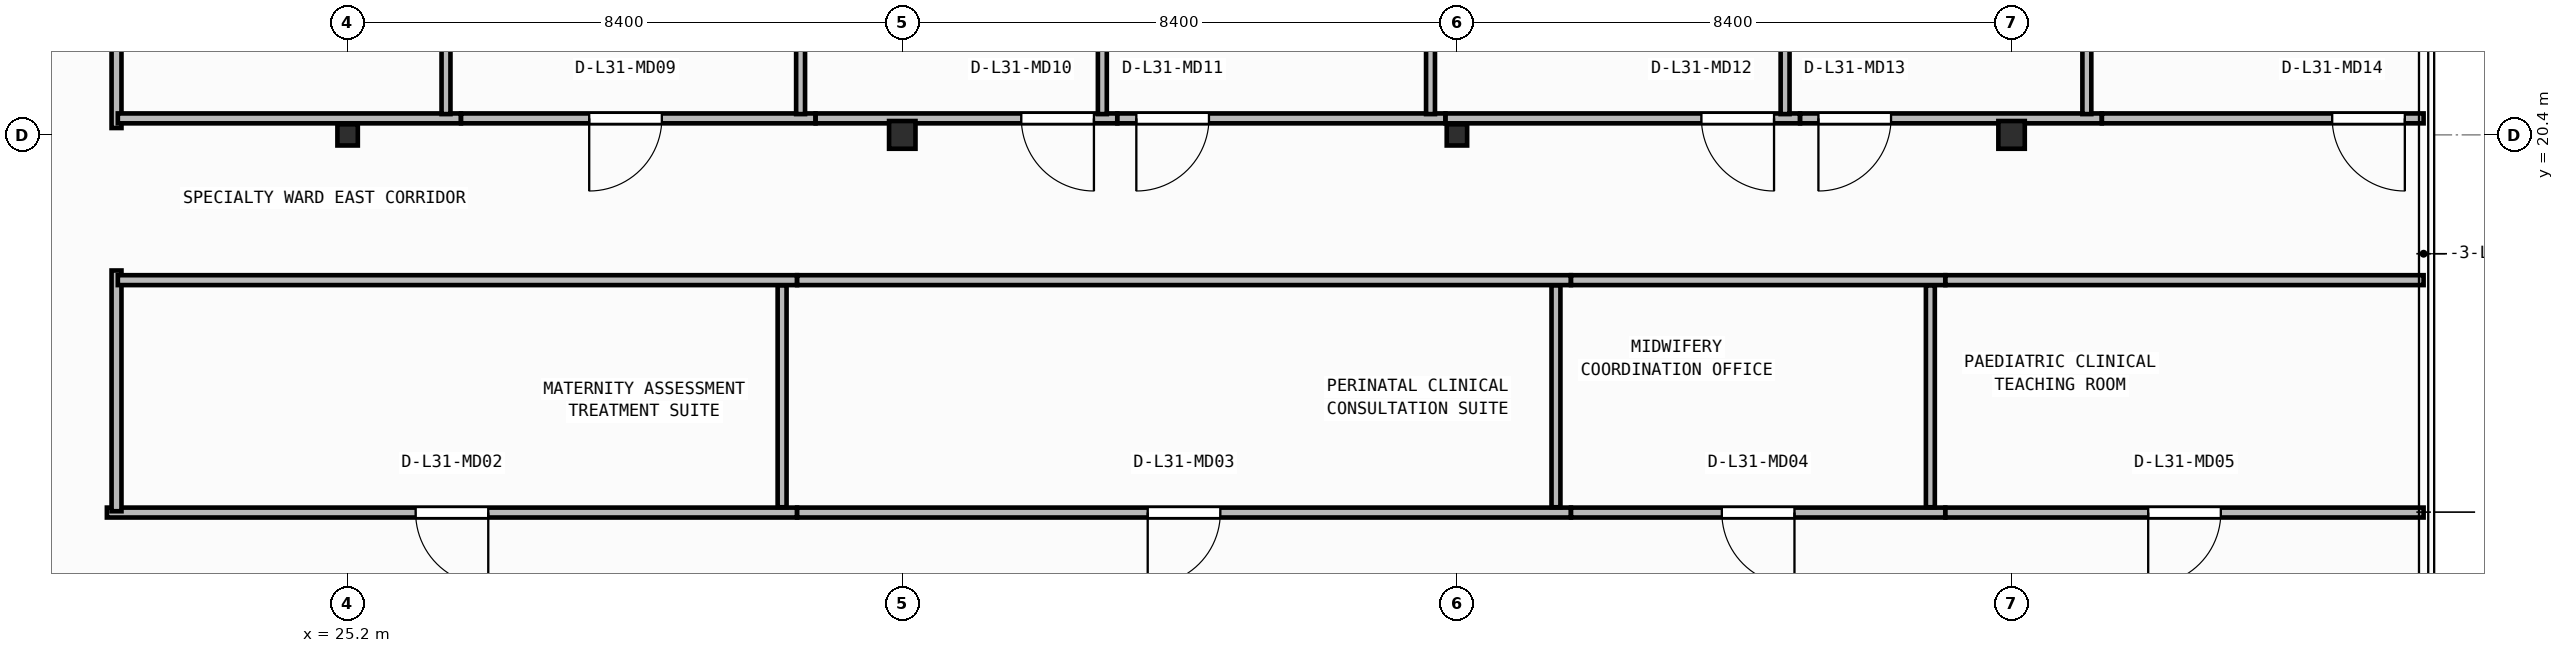
"""IFC4 building model, lengths in metres.
Left out: names, types, materials, properties, quantities, classifications, styles, units other than length and angle.
Written with IfcOpenShell. Run it as: python <this file> out.ifc"""

import sys

from ifc_helpers import new_model, si_unit, direction, frame, frame_2d, origin, origin_2d, place, context, subcontext, project, spatial, rectangle, i_section, extrude, element, fill, save


model = new_model("IFC4")
c1 = context("Model", 3, precision=1e-05, world=origin(), true_north=direction((0.0, 1.0)))
c2 = subcontext(c1, "Body", "Model", "MODEL_VIEW")
j1 = project(units=[si_unit("LENGTHUNIT", "METRE"), si_unit("PLANEANGLEUNIT", "RADIAN")], contexts=[c1])
p1 = place(None, origin())
s1 = spatial("IfcSite", under=j1, at=p1, CompositionType="ELEMENT")
p2 = place(p1, origin())
s2 = spatial("IfcBuilding", under=s1, at=p2, CompositionType="ELEMENT")
p3 = place(p2, frame((0.0, 0.0, 127.05)))
s3 = spatial("IfcBuildingStorey", under=s2, at=p3, CompositionType="ELEMENT", Elevation=127.05)
p4 = place(p3, frame((25.2, 20.4, 0.0), z_axis=(0.0, 0.0, 1.0), x_axis=(1.0, 0.0, 0.0)))
e1 = element("IfcColumn", 1, at=p4, inside=s3, PredefinedType="COLUMN", context=c2, shape_type="SweptSolid", body=[
    extrude(i_section(OverallWidth=0.309, OverallDepth=0.321, WebThickness=0.014, FlangeThickness=0.022, FilletRadius=0.017, at=origin_2d()), origin(), (0.0, 0.0, 1.0), 3.95),
])
p5 = place(p3, frame((33.6, 20.4, 0.0), z_axis=(0.0, 0.0, 1.0), x_axis=(1.0, 0.0, 0.0)))
e2 = element("IfcColumn", 2, at=p5, inside=s3, PredefinedType="COLUMN", context=c2, shape_type="SweptSolid", body=[
    extrude(i_section(OverallWidth=0.4, OverallDepth=0.42, WebThickness=0.025, FlangeThickness=0.04, at=origin_2d()), origin(), (0.0, 0.0, 1.0), 3.95),
])
p6 = place(p3, frame((42.0, 20.4, 0.0), z_axis=(0.0, 0.0, 1.0), x_axis=(1.0, 0.0, 0.0)))
e3 = element("IfcColumn", 3, at=p6, inside=s3, PredefinedType="COLUMN", context=c2, shape_type="SweptSolid", body=[
    extrude(i_section(OverallWidth=0.309, OverallDepth=0.321, WebThickness=0.014, FlangeThickness=0.022, FilletRadius=0.017, at=origin_2d()), origin(), (0.0, 0.0, 1.0), 3.95),
])
p7 = place(p3, frame((50.4, 20.4, 0.0), z_axis=(0.0, 0.0, 1.0), x_axis=(1.0, 0.0, 0.0)))
e4 = element("IfcColumn", 4, at=p7, inside=s3, PredefinedType="COLUMN", context=c2, shape_type="SweptSolid", body=[
    extrude(i_section(OverallWidth=0.4, OverallDepth=0.42, WebThickness=0.025, FlangeThickness=0.04, at=origin_2d()), origin(), (0.0, 0.0, 1.0), 3.95),
])
p8 = place(p3, frame((32.006, 14.68, 0.0), z_axis=(0.0, 0.0, 1.0), x_axis=(-1.0, 0.0, 0.0)))
e5 = element("IfcWall", 5, at=p8, inside=s3, PredefinedType="PARTITIONING", context=c2, shape_type="SweptSolid", body=[
    extrude(rectangle(XDim=10.452, YDim=0.15, at=frame_2d((5.226, 0.0))), origin(), (0.0, 0.0, 1.0), 3.71),
])
p9 = place(p8, frame((4.676, 0.0, 0.0)))
e6 = element("IfcOpeningElement", 6, at=p9, cuts=e5, PredefinedType="OPENING", context=c2, shape_type="SweptSolid", body=[
    extrude(rectangle(XDim=1.1, YDim=2.1, at=frame_2d((0.55, 1.05))), frame((0.0, 0.085, 0.0), z_axis=(0.0, -1.0, 0.0), x_axis=(1.0, 0.0, 0.0)), (0.0, 0.0, 1.0), 0.17),
])
p10 = place(p3, frame((43.726, 14.68, 0.0), z_axis=(0.0, 0.0, 1.0), x_axis=(-1.0, 0.0, 0.0)))
e7 = element("IfcWall", 7, at=p10, inside=s3, PredefinedType="PARTITIONING", context=c2, shape_type="SweptSolid", body=[
    extrude(rectangle(XDim=11.718, YDim=0.15, at=frame_2d((5.859, 0.0))), origin(), (0.0, 0.0, 1.0), 3.71),
])
p11 = place(p10, frame((5.309, 0.0, 0.0)))
e8 = element("IfcOpeningElement", 8, at=p11, cuts=e7, PredefinedType="OPENING", context=c2, shape_type="SweptSolid", body=[
    extrude(rectangle(XDim=1.1, YDim=2.1, at=frame_2d((0.55, 1.05))), frame((0.0, 0.085, 0.0), z_axis=(0.0, -1.0, 0.0), x_axis=(1.0, 0.0, 0.0)), (0.0, 0.0, 1.0), 0.17),
])
p12 = place(p3, frame((49.396, 14.68, 0.0), z_axis=(0.0, 0.0, 1.0), x_axis=(-1.0, 0.0, 0.0)))
e9 = element("IfcWall", 9, at=p12, inside=s3, PredefinedType="PARTITIONING", context=c2, shape_type="SweptSolid", body=[
    extrude(rectangle(XDim=5.668, YDim=0.15, at=frame_2d((2.834, 0.0))), origin(), (0.0, 0.0, 1.0), 3.71),
])
p13 = place(p12, frame((2.284, 0.0, 0.0)))
e10 = element("IfcOpeningElement", 10, at=p13, cuts=e9, PredefinedType="OPENING", context=c2, shape_type="SweptSolid", body=[
    extrude(rectangle(XDim=1.1, YDim=2.1, at=frame_2d((0.55, 1.05))), frame((0.0, 0.085, 0.0), z_axis=(0.0, -1.0, 0.0), x_axis=(1.0, 0.0, 0.0)), (0.0, 0.0, 1.0), 0.17),
])
p14 = place(p3, frame((56.64, 14.68, 0.0), z_axis=(0.0, 0.0, 1.0), x_axis=(-1.0, 0.0, 0.0)))
e11 = element("IfcWall", 11, at=p14, inside=s3, PredefinedType="PARTITIONING", context=c2, shape_type="SweptSolid", body=[
    extrude(rectangle(XDim=7.242, YDim=0.15, at=frame_2d((3.621, 0.0))), origin(), (0.0, 0.0, 1.0), 3.71),
])
p15 = place(p14, frame((3.071, 0.0, 0.0)))
e12 = element("IfcOpeningElement", 12, at=p15, cuts=e11, PredefinedType="OPENING", context=c2, shape_type="SweptSolid", body=[
    extrude(rectangle(XDim=1.1, YDim=2.1, at=frame_2d((0.55, 1.05))), frame((0.0, 0.085, 0.0), z_axis=(0.0, -1.0, 0.0), x_axis=(1.0, 0.0, 0.0)), (0.0, 0.0, 1.0), 0.17),
])
p16 = place(p3, frame((21.7, 14.7, 0.0), z_axis=(0.0, 0.0, 1.0), x_axis=(0.0, 1.0, 0.0)))
e13 = element("IfcWall", 13, at=p16, inside=s3, PredefinedType="PARTITIONING", context=c2, shape_type="SweptSolid", body=[
    extrude(rectangle(XDim=3.646, YDim=0.15, at=frame_2d((1.823, 0.0))), origin(), (0.0, 0.0, 1.0), 3.71),
])
p17 = place(p3, frame((21.7, 20.504, 0.0), z_axis=(0.0, 0.0, 1.0), x_axis=(0.0, 1.0, 0.0)))
e14 = element("IfcWall", 14, at=p17, inside=s3, PredefinedType="PARTITIONING", context=c2, shape_type="SweptSolid", body=[
    extrude(rectangle(XDim=6.756, YDim=0.15, at=frame_2d((3.378, 0.0))), origin(), (0.0, 0.0, 1.0), 3.71),
])
p18 = place(p17, frame((2.828, 0.0, 0.0)))
e15 = element("IfcOpeningElement", 15, at=p18, cuts=e14, PredefinedType="OPENING", context=c2, shape_type="SweptSolid", body=[
    extrude(rectangle(XDim=1.1, YDim=2.1, at=frame_2d((0.55, 1.05))), frame((0.0, 0.085, 0.0), z_axis=(0.0, -1.0, 0.0), x_axis=(1.0, 0.0, 0.0)), (0.0, 0.0, 1.0), 0.17),
])
p19 = place(p3, frame((21.72, 18.2, 0.0), z_axis=(0.0, 0.0, 1.0), x_axis=(1.0, 0.0, 0.0)))
e16 = element("IfcWall", 16, at=p19, inside=s3, PredefinedType="PARTITIONING", context=c2, shape_type="SweptSolid", body=[
    extrude(rectangle(XDim=10.286, YDim=0.15, at=frame_2d((5.143, 0.0))), origin(), (0.0, 0.0, 1.0), 3.71),
])
p20 = place(p3, frame((32.008, 18.2, 0.0), z_axis=(0.0, 0.0, 1.0), x_axis=(1.0, 0.0, 0.0)))
e17 = element("IfcWall", 17, at=p20, inside=s3, PredefinedType="PARTITIONING", context=c2, shape_type="SweptSolid", body=[
    extrude(rectangle(XDim=11.718, YDim=0.15, at=frame_2d((5.859, 0.0))), origin(), (0.0, 0.0, 1.0), 3.71),
])
p21 = place(p3, frame((43.728, 18.2, 0.0), z_axis=(0.0, 0.0, 1.0), x_axis=(1.0, 0.0, 0.0)))
e18 = element("IfcWall", 18, at=p21, inside=s3, PredefinedType="PARTITIONING", context=c2, shape_type="SweptSolid", body=[
    extrude(rectangle(XDim=5.668, YDim=0.15, at=frame_2d((2.834, 0.0))), origin(), (0.0, 0.0, 1.0), 3.71),
])
p22 = place(p3, frame((49.398, 18.2, 0.0), z_axis=(0.0, 0.0, 1.0), x_axis=(1.0, 0.0, 0.0)))
e19 = element("IfcWall", 19, at=p22, inside=s3, PredefinedType="PARTITIONING", context=c2, shape_type="SweptSolid", body=[
    extrude(rectangle(XDim=7.242, YDim=0.15, at=frame_2d((3.621, 0.0))), origin(), (0.0, 0.0, 1.0), 3.71),
])
p23 = place(p3, frame((26.916, 20.65, 0.0), z_axis=(0.0, 0.0, 1.0), x_axis=(-1.0, 0.0, 0.0)))
e20 = element("IfcWall", 20, at=p23, inside=s3, PredefinedType="PARTITIONING", context=c2, shape_type="SweptSolid", body=[
    extrude(rectangle(XDim=5.196, YDim=0.15, at=frame_2d((2.598, 0.0))), origin(), (0.0, 0.0, 1.0), 3.083),
])
p24 = place(p3, frame((32.286, 20.65, 0.0), z_axis=(0.0, 0.0, 1.0), x_axis=(-1.0, 0.0, 0.0)))
e21 = element("IfcWall", 21, at=p24, inside=s3, PredefinedType="PARTITIONING", context=c2, shape_type="SweptSolid", body=[
    extrude(rectangle(XDim=5.368, YDim=0.15, at=frame_2d((2.684, 0.0))), origin(), (0.0, 0.0, 1.0), 3.083),
])
p25 = place(p24, frame((2.327, 0.0, 0.0)))
e22 = element("IfcOpeningElement", 22, at=p25, cuts=e21, PredefinedType="OPENING", context=c2, shape_type="SweptSolid", body=[
    extrude(rectangle(XDim=1.1, YDim=2.1, at=frame_2d((0.55, 1.05))), frame((0.0, 0.085, 0.0), z_axis=(0.0, -1.0, 0.0), x_axis=(1.0, 0.0, 0.0)), (0.0, 0.0, 1.0), 0.17),
])
p26 = place(p3, frame((36.856, 20.65, 0.0), z_axis=(0.0, 0.0, 1.0), x_axis=(-1.0, 0.0, 0.0)))
e23 = element("IfcWall", 23, at=p26, inside=s3, PredefinedType="PARTITIONING", context=c2, shape_type="SweptSolid", body=[
    extrude(rectangle(XDim=4.568, YDim=0.15, at=frame_2d((2.284, 0.0))), origin(), (0.0, 0.0, 1.0), 3.083),
])
p27 = place(p26, frame((0.354, 0.0, 0.0)))
e24 = element("IfcOpeningElement", 24, at=p27, cuts=e23, PredefinedType="OPENING", context=c2, shape_type="SweptSolid", body=[
    extrude(rectangle(XDim=1.1, YDim=2.1, at=frame_2d((0.55, 1.05))), frame((0.0, 0.085, 0.0), z_axis=(0.0, -1.0, 0.0), x_axis=(1.0, 0.0, 0.0)), (0.0, 0.0, 1.0), 0.17),
])
p28 = place(p3, frame((41.826, 20.65, 0.0), z_axis=(0.0, 0.0, 1.0), x_axis=(-1.0, 0.0, 0.0)))
e25 = element("IfcWall", 25, at=p28, inside=s3, PredefinedType="PARTITIONING", context=c2, shape_type="SweptSolid", body=[
    extrude(rectangle(XDim=4.968, YDim=0.15, at=frame_2d((2.484, 0.0))), origin(), (0.0, 0.0, 1.0), 3.083),
])
p29 = place(p28, frame((3.581, 0.0, 0.0)))
e26 = element("IfcOpeningElement", 26, at=p29, cuts=e25, PredefinedType="OPENING", context=c2, shape_type="SweptSolid", body=[
    extrude(rectangle(XDim=1.1, YDim=2.1, at=frame_2d((0.55, 1.05))), frame((0.0, 0.085, 0.0), z_axis=(0.0, -1.0, 0.0), x_axis=(1.0, 0.0, 0.0)), (0.0, 0.0, 1.0), 0.17),
])
p30 = place(p3, frame((47.196, 20.65, 0.0), z_axis=(0.0, 0.0, 1.0), x_axis=(-1.0, 0.0, 0.0)))
e27 = element("IfcWall", 27, at=p30, inside=s3, PredefinedType="PARTITIONING", context=c2, shape_type="SweptSolid", body=[
    extrude(rectangle(XDim=5.368, YDim=0.15, at=frame_2d((2.684, 0.0))), origin(), (0.0, 0.0, 1.0), 3.083),
])
p31 = place(p30, frame((0.393, 0.0, 0.0)))
e28 = element("IfcOpeningElement", 28, at=p31, cuts=e27, PredefinedType="OPENING", context=c2, shape_type="SweptSolid", body=[
    extrude(rectangle(XDim=1.1, YDim=2.1, at=frame_2d((0.55, 1.05))), frame((0.0, 0.085, 0.0), z_axis=(0.0, -1.0, 0.0), x_axis=(1.0, 0.0, 0.0)), (0.0, 0.0, 1.0), 0.17),
])
p32 = place(p3, frame((51.766, 20.65, 0.0), z_axis=(0.0, 0.0, 1.0), x_axis=(-1.0, 0.0, 0.0)))
e29 = element("IfcWall", 29, at=p32, inside=s3, PredefinedType="PARTITIONING", context=c2, shape_type="SweptSolid", body=[
    extrude(rectangle(XDim=4.568, YDim=0.15, at=frame_2d((2.284, 0.0))), origin(), (0.0, 0.0, 1.0), 3.083),
])
p33 = place(p32, frame((3.191, 0.0, 0.0)))
e30 = element("IfcOpeningElement", 30, at=p33, cuts=e29, PredefinedType="OPENING", context=c2, shape_type="SweptSolid", body=[
    extrude(rectangle(XDim=1.1, YDim=2.1, at=frame_2d((0.55, 1.05))), frame((0.0, 0.085, 0.0), z_axis=(0.0, -1.0, 0.0), x_axis=(1.0, 0.0, 0.0)), (0.0, 0.0, 1.0), 0.17),
])
p34 = place(p3, frame((56.64, 20.65, 0.0), z_axis=(0.0, 0.0, 1.0), x_axis=(-1.0, 0.0, 0.0)))
e31 = element("IfcWall", 31, at=p34, inside=s3, PredefinedType="PARTITIONING", context=c2, shape_type="SweptSolid", body=[
    extrude(rectangle(XDim=4.872, YDim=0.15, at=frame_2d((2.436, 0.0))), origin(), (0.0, 0.0, 1.0), 3.71),
])
p35 = place(p34, frame((0.284, 0.0, 0.0)))
e32 = element("IfcOpeningElement", 32, at=p35, cuts=e31, PredefinedType="OPENING", context=c2, shape_type="SweptSolid", body=[
    extrude(rectangle(XDim=1.1, YDim=2.1, at=frame_2d((0.55, 1.05))), frame((0.0, 0.085, 0.0), z_axis=(0.0, -1.0, 0.0), x_axis=(1.0, 0.0, 0.0)), (0.0, 0.0, 1.0), 0.17),
])
for number, where, z_axis, x_axis in (
    (33, (31.78, 14.76, 0.0), (0.0, 0.0, 1.0), (0.0, 1.0, 0.0)),
    (34, (43.5, 14.76, 0.0), (0.0, 0.0, 1.0), (0.0, 1.0, 0.0)),
    (35, (49.17, 14.76, 0.0), (0.0, 0.0, 1.0), (0.0, 1.0, 0.0)),
):
    element("IfcWall", number, at=place(p3, frame(where, z_axis=z_axis, x_axis=x_axis)), inside=s3, PredefinedType="PARTITIONING", context=c2, shape_type="SweptSolid", body=[
        extrude(rectangle(XDim=3.36, YDim=0.135, at=frame_2d((1.68, 0.0))), origin(), (0.0, 0.0, 1.0), 3.71),
    ])
for number, where, z_axis, x_axis in (
    (36, (26.69, 20.715, 0.0), (0.0, 0.0, 1.0), (0.0, 1.0, 0.0)),
    (37, (32.06, 20.715, 0.0), (0.0, 0.0, 1.0), (0.0, 1.0, 0.0)),
    (38, (36.63, 20.715, 0.0), (0.0, 0.0, 1.0), (0.0, 1.0, 0.0)),
):
    element("IfcWall", number, at=place(p3, frame(where, z_axis=z_axis, x_axis=x_axis)), inside=s3, PredefinedType="PARTITIONING", context=c2, shape_type="SweptSolid", body=[
        extrude(rectangle(XDim=6.385, YDim=0.135, at=frame_2d((3.192, 0.0))), origin(), (0.0, 0.0, 1.0), 3.71),
    ])
p36 = place(p3, frame((41.6, 20.715, 0.0), z_axis=(0.0, 0.0, 1.0), x_axis=(0.0, 1.0, 0.0)))
e39 = element("IfcWall", 39, at=p36, inside=s3, PredefinedType="PARTITIONING", context=c2, shape_type="SweptSolid", body=[
    extrude(rectangle(XDim=6.385, YDim=0.135, at=frame_2d((3.192, 0.0))), origin(), (0.0, 0.0, 1.0), 3.152),
])
for number, where, z_axis, x_axis in (
    (40, (46.97, 20.715, 0.0), (0.0, 0.0, 1.0), (0.0, 1.0, 0.0)),
    (41, (51.54, 20.715, 0.0), (0.0, 0.0, 1.0), (0.0, 1.0, 0.0)),
):
    element("IfcWall", number, at=place(p3, frame(where, z_axis=z_axis, x_axis=x_axis)), inside=s3, PredefinedType="PARTITIONING", context=c2, shape_type="SweptSolid", body=[
        extrude(rectangle(XDim=6.385, YDim=0.135, at=frame_2d((3.192, 0.0))), origin(), (0.0, 0.0, 1.0), 3.71),
    ])
p37 = place(p9, origin())
e42 = element("IfcDoor", 42, at=p37, inside=s3, OperationType="SINGLE_SWING_LEFT", PredefinedType="DOOR", context=c2, shape_type="SweptSolid", body=[
    extrude(rectangle(XDim=1.1, YDim=2.1, at=frame_2d((0.55, 1.05))), frame((0.0, 0.025, 0.0), z_axis=(0.0, -1.0, 0.0), x_axis=(1.0, 0.0, 0.0)), (0.0, 0.0, 1.0), 0.05),
])
fill(e6, e42)
p38 = place(p11, origin())
e43 = element("IfcDoor", 43, at=p38, inside=s3, OperationType="SINGLE_SWING_RIGHT", PredefinedType="DOOR", context=c2, shape_type="SweptSolid", body=[
    extrude(rectangle(XDim=1.1, YDim=2.1, at=frame_2d((0.55, 1.05))), frame((0.0, 0.025, 0.0), z_axis=(0.0, -1.0, 0.0), x_axis=(1.0, 0.0, 0.0)), (0.0, 0.0, 1.0), 0.05),
])
fill(e8, e43)
p39 = place(p13, origin())
e44 = element("IfcDoor", 44, at=p39, inside=s3, OperationType="SINGLE_SWING_LEFT", PredefinedType="DOOR", context=c2, shape_type="SweptSolid", body=[
    extrude(rectangle(XDim=1.1, YDim=2.1, at=frame_2d((0.55, 1.05))), frame((0.0, 0.025, 0.0), z_axis=(0.0, -1.0, 0.0), x_axis=(1.0, 0.0, 0.0)), (0.0, 0.0, 1.0), 0.05),
])
fill(e10, e44)
p40 = place(p15, origin())
e45 = element("IfcDoor", 45, at=p40, inside=s3, OperationType="SINGLE_SWING_RIGHT", PredefinedType="DOOR", context=c2, shape_type="SweptSolid", body=[
    extrude(rectangle(XDim=1.1, YDim=2.1, at=frame_2d((0.55, 1.05))), frame((0.0, 0.025, 0.0), z_axis=(0.0, -1.0, 0.0), x_axis=(1.0, 0.0, 0.0)), (0.0, 0.0, 1.0), 0.05),
])
fill(e12, e45)
p41 = place(p25, origin())
e46 = element("IfcDoor", 46, at=p41, inside=s3, OperationType="SINGLE_SWING_RIGHT", PredefinedType="DOOR", context=c2, shape_type="SweptSolid", body=[
    extrude(rectangle(XDim=1.1, YDim=2.1, at=frame_2d((0.55, 1.05))), frame((0.0, 0.025, 0.0), z_axis=(0.0, -1.0, 0.0), x_axis=(1.0, 0.0, 0.0)), (0.0, 0.0, 1.0), 0.05),
])
fill(e22, e46)
p42 = place(p27, origin())
e47 = element("IfcDoor", 47, at=p42, inside=s3, OperationType="SINGLE_SWING_LEFT", PredefinedType="DOOR", context=c2, shape_type="SweptSolid", body=[
    extrude(rectangle(XDim=1.1, YDim=2.1, at=frame_2d((0.55, 1.05))), frame((0.0, 0.025, 0.0), z_axis=(0.0, -1.0, 0.0), x_axis=(1.0, 0.0, 0.0)), (0.0, 0.0, 1.0), 0.05),
])
fill(e24, e47)
p43 = place(p29, origin())
e48 = element("IfcDoor", 48, at=p43, inside=s3, OperationType="SINGLE_SWING_RIGHT", PredefinedType="DOOR", context=c2, shape_type="SweptSolid", body=[
    extrude(rectangle(XDim=1.1, YDim=2.1, at=frame_2d((0.55, 1.05))), frame((0.0, 0.025, 0.0), z_axis=(0.0, -1.0, 0.0), x_axis=(1.0, 0.0, 0.0)), (0.0, 0.0, 1.0), 0.05),
])
fill(e26, e48)
p44 = place(p31, origin())
e49 = element("IfcDoor", 49, at=p44, inside=s3, OperationType="SINGLE_SWING_LEFT", PredefinedType="DOOR", context=c2, shape_type="SweptSolid", body=[
    extrude(rectangle(XDim=1.1, YDim=2.1, at=frame_2d((0.55, 1.05))), frame((0.0, 0.025, 0.0), z_axis=(0.0, -1.0, 0.0), x_axis=(1.0, 0.0, 0.0)), (0.0, 0.0, 1.0), 0.05),
])
fill(e28, e49)
p45 = place(p33, origin())
e50 = element("IfcDoor", 50, at=p45, inside=s3, OperationType="SINGLE_SWING_RIGHT", PredefinedType="DOOR", context=c2, shape_type="SweptSolid", body=[
    extrude(rectangle(XDim=1.1, YDim=2.1, at=frame_2d((0.55, 1.05))), frame((0.0, 0.025, 0.0), z_axis=(0.0, -1.0, 0.0), x_axis=(1.0, 0.0, 0.0)), (0.0, 0.0, 1.0), 0.05),
])
fill(e30, e50)
p46 = place(p35, origin())
e51 = element("IfcDoor", 51, at=p46, inside=s3, OperationType="SINGLE_SWING_LEFT", PredefinedType="DOOR", context=c2, shape_type="SweptSolid", body=[
    extrude(rectangle(XDim=1.1, YDim=2.1, at=frame_2d((0.55, 1.05))), frame((0.0, 0.025, 0.0), z_axis=(0.0, -1.0, 0.0), x_axis=(1.0, 0.0, 0.0)), (0.0, 0.0, 1.0), 0.05),
])
fill(e32, e51)
save(model, sys.argv[1])
